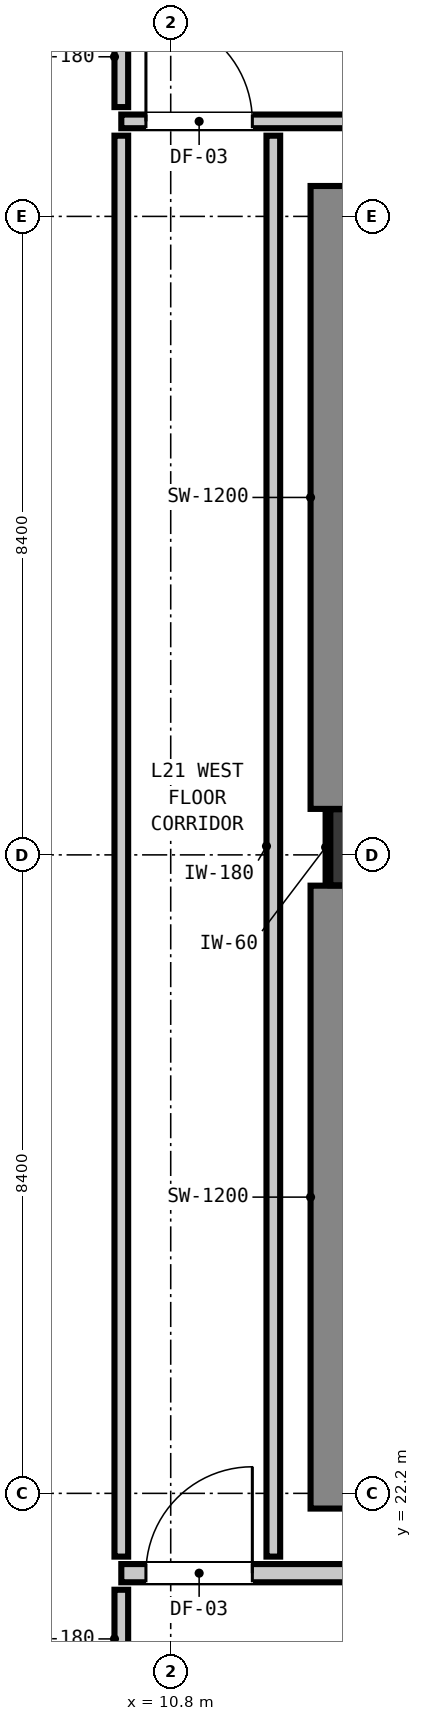
"""IFC4 building model, lengths in metres.
Left out: names, types, materials, properties, quantities, classifications, styles, units other than length and angle.
Written with IfcOpenShell. Run it as: python <this file> out.ifc"""

import sys

from ifc_helpers import new_model, si_unit, direction, frame, frame_2d, origin, origin_2d, place, context, subcontext, project, spatial, rectangle, extrude, element, fill, save


model = new_model("IFC4")
c1 = context("Model", 3, precision=1e-05, world=origin(), true_north=direction((0.0, 1.0)))
c2 = subcontext(c1, "Body", "Model", "MODEL_VIEW")
j1 = project(units=[si_unit("LENGTHUNIT", "METRE"), si_unit("PLANEANGLEUNIT", "RADIAN")], contexts=[c1])
p1 = place(None, origin())
s1 = spatial("IfcSite", under=j1, at=p1, CompositionType="ELEMENT")
p2 = place(p1, origin())
s2 = spatial("IfcBuilding", under=s1, at=p2, CompositionType="ELEMENT")
p3 = place(p2, frame((0.0, 0.0, 75.12)))
s3 = spatial("IfcBuildingStorey", under=s2, at=p3, CompositionType="ELEMENT", Elevation=75.12)
p4 = place(p3, frame((13.4, 30.7, 0.0), z_axis=(0.0, 0.0, 1.0), x_axis=(1.0, 0.0, 0.0)))
e1 = element("IfcColumn", 1, at=p4, inside=s3, PredefinedType="COLUMN", context=c2, shape_type="SweptSolid", body=[
    extrude(rectangle(XDim=1.0, YDim=1.0, at=origin_2d()), origin(), (0.0, 0.0, 1.0), 3.32),
])
p5 = place(p3, frame((13.24, 22.0, 0.0), z_axis=(0.0, 0.0, 1.0), x_axis=(0.0, 1.0, 0.0)))
e2 = element("IfcWall", 2, at=p5, inside=s3, PredefinedType="SHEAR", context=c2, shape_type="SweptSolid", body=[
    extrude(rectangle(XDim=8.195, YDim=1.2, at=frame_2d((4.098, 0.0))), origin(), (0.0, 0.0, 1.0), 3.32),
])
p6 = place(p3, frame((13.24, 31.205, 0.0), z_axis=(0.0, 0.0, 1.0), x_axis=(0.0, 1.0, 0.0)))
e3 = element("IfcWall", 3, at=p6, inside=s3, PredefinedType="SHEAR", context=c2, shape_type="SweptSolid", body=[
    extrude(rectangle(XDim=8.195, YDim=1.2, at=frame_2d((4.097, 0.0))), origin(), (0.0, 0.0, 1.0), 3.32),
])
p7 = place(p3, frame((10.15, 21.15, 0.0), z_axis=(0.0, 0.0, 1.0), x_axis=(1.0, 0.0, 0.0)))
e4 = element("IfcWall", 4, at=p7, inside=s3, PredefinedType="PARTITIONING", context=c2, shape_type="SweptSolid", body=[
    extrude(rectangle(XDim=26.779, YDim=0.24, at=frame_2d((13.39, 0.0))), origin(), (0.0, 0.0, 1.0), 3.06),
])
p8 = place(p7, frame((8.06, 0.0, 0.0)))
e5 = element("IfcOpeningElement", 5, at=p8, cuts=e4, PredefinedType="OPENING", context=c2, shape_type="SweptSolid", body=[
    extrude(rectangle(XDim=1.1, YDim=2.15, at=frame_2d((0.55, 1.075))), frame((0.0, 0.13, 0.0), z_axis=(0.0, -1.0, 0.0), x_axis=(1.0, 0.0, 0.0)), (0.0, 0.0, 1.0), 0.26),
])
p9 = place(p7, frame((0.324, 0.0, 0.0)))
e6 = element("IfcOpeningElement", 6, at=p9, cuts=e4, PredefinedType="OPENING", context=c2, shape_type="SweptSolid", body=[
    extrude(rectangle(XDim=1.4, YDim=2.15, at=frame_2d((0.7, 1.075))), frame((0.0, 0.13, 0.0), z_axis=(0.0, -1.0, 0.0), x_axis=(1.0, 0.0, 0.0)), (0.0, 0.0, 1.0), 0.26),
])
p10 = place(p3, frame((10.15, 40.25, 0.0), z_axis=(0.0, 0.0, 1.0), x_axis=(1.0, 0.0, 0.0)))
e7 = element("IfcWall", 7, at=p10, inside=s3, PredefinedType="PARTITIONING", context=c2, shape_type="SweptSolid", body=[
    extrude(rectangle(XDim=40.023, YDim=0.18, at=frame_2d((20.012, 0.0))), origin(), (0.0, 0.0, 1.0), 3.06),
])
p11 = place(p10, frame((7.285, 0.0, 0.0)))
e8 = element("IfcOpeningElement", 8, at=p11, cuts=e7, PredefinedType="OPENING", context=c2, shape_type="SweptSolid", body=[
    extrude(rectangle(XDim=1.4, YDim=2.15, at=frame_2d((0.7, 1.075))), frame((0.0, 0.1, 0.0), z_axis=(0.0, -1.0, 0.0), x_axis=(1.0, 0.0, 0.0)), (0.0, 0.0, 1.0), 0.2),
])
p12 = place(p10, frame((0.324, 0.0, 0.0)))
e9 = element("IfcOpeningElement", 9, at=p12, cuts=e7, PredefinedType="OPENING", context=c2, shape_type="SweptSolid", body=[
    extrude(rectangle(XDim=1.4, YDim=2.15, at=frame_2d((0.7, 1.075))), frame((0.0, 0.1, 0.0), z_axis=(0.0, -1.0, 0.0), x_axis=(1.0, 0.0, 0.0)), (0.0, 0.0, 1.0), 0.2),
])
p13 = place(p10, frame((33.574, 0.0, 0.0)))
e10 = element("IfcOpeningElement", 10, at=p13, cuts=e7, PredefinedType="OPENING", context=c2, shape_type="SweptSolid", body=[
    extrude(rectangle(XDim=1.0, YDim=2.15, at=frame_2d((0.5, 1.075))), frame((0.0, 0.1, 0.0), z_axis=(0.0, -1.0, 0.0), x_axis=(1.0, 0.0, 0.0)), (0.0, 0.0, 1.0), 0.2),
])
p14 = place(p3, frame((10.15, 19.638, 0.0), z_axis=(0.0, 0.0, 1.0), x_axis=(0.0, 1.0, 0.0)))
e11 = element("IfcWall", 11, at=p14, inside=s3, PredefinedType="PARTITIONING", context=c2, shape_type="SweptSolid", body=[
    extrude(rectangle(XDim=1.294, YDim=0.18, at=frame_2d((0.647, 0.0))), origin(), (0.0, 0.0, 1.0), 2.445),
])
p15 = place(p3, frame((10.15, 21.368, 0.0), z_axis=(0.0, 0.0, 1.0), x_axis=(0.0, 1.0, 0.0)))
e12 = element("IfcWall", 12, at=p15, inside=s3, PredefinedType="PARTITIONING", context=c2, shape_type="SweptSolid", body=[
    extrude(rectangle(XDim=18.694, YDim=0.18, at=frame_2d((9.347, 0.0))), origin(), (0.0, 0.0, 1.0), 3.06),
])
p16 = place(p3, frame((10.15, 40.438, 0.0), z_axis=(0.0, 0.0, 1.0), x_axis=(0.0, 1.0, 0.0)))
e13 = element("IfcWall", 13, at=p16, inside=s3, PredefinedType="PARTITIONING", context=c2, shape_type="SweptSolid", body=[
    extrude(rectangle(XDim=1.324, YDim=0.18, at=frame_2d((0.662, 0.0))), origin(), (0.0, 0.0, 1.0), 3.06),
])
p17 = place(p3, frame((12.15, 21.368, 0.0), z_axis=(0.0, 0.0, 1.0), x_axis=(0.0, 1.0, 0.0)))
e14 = element("IfcWall", 14, at=p17, inside=s3, PredefinedType="PARTITIONING", context=c2, shape_type="SweptSolid", body=[
    extrude(rectangle(XDim=18.694, YDim=0.18, at=frame_2d((9.347, 0.0))), origin(), (0.0, 0.0, 1.0), 3.06),
])
p18 = place(p3, frame((12.868, 30.21, 0.0), z_axis=(0.0, 0.0, 1.0), x_axis=(0.0, 1.0, 0.0)))
e15 = element("IfcWall", 15, at=p18, inside=s3, PredefinedType="PARTITIONING", context=c2, shape_type="SweptSolid", body=[
    extrude(rectangle(XDim=0.98, YDim=0.06, at=frame_2d((0.49, 0.0))), origin(), (0.0, 0.0, 1.0), 1.45),
])
p19 = place(p9, origin())
e16 = element("IfcDoor", 16, at=p19, inside=s3, OperationType="SINGLE_SWING_RIGHT", PredefinedType="DOOR", context=c2, shape_type="SweptSolid", body=[
    extrude(rectangle(XDim=1.4, YDim=2.15, at=frame_2d((0.7, 1.075))), frame((0.0, 0.025, 0.0), z_axis=(0.0, -1.0, 0.0), x_axis=(1.0, 0.0, 0.0)), (0.0, 0.0, 1.0), 0.05),
])
fill(e6, e16)
p20 = place(p12, origin())
e17 = element("IfcDoor", 17, at=p20, inside=s3, OperationType="SINGLE_SWING_LEFT", PredefinedType="DOOR", context=c2, shape_type="SweptSolid", body=[
    extrude(rectangle(XDim=1.4, YDim=2.15, at=frame_2d((0.7, 1.075))), frame((0.0, 0.025, 0.0), z_axis=(0.0, -1.0, 0.0), x_axis=(1.0, 0.0, 0.0)), (0.0, 0.0, 1.0), 0.05),
])
fill(e9, e17)
save(model, sys.argv[1])
